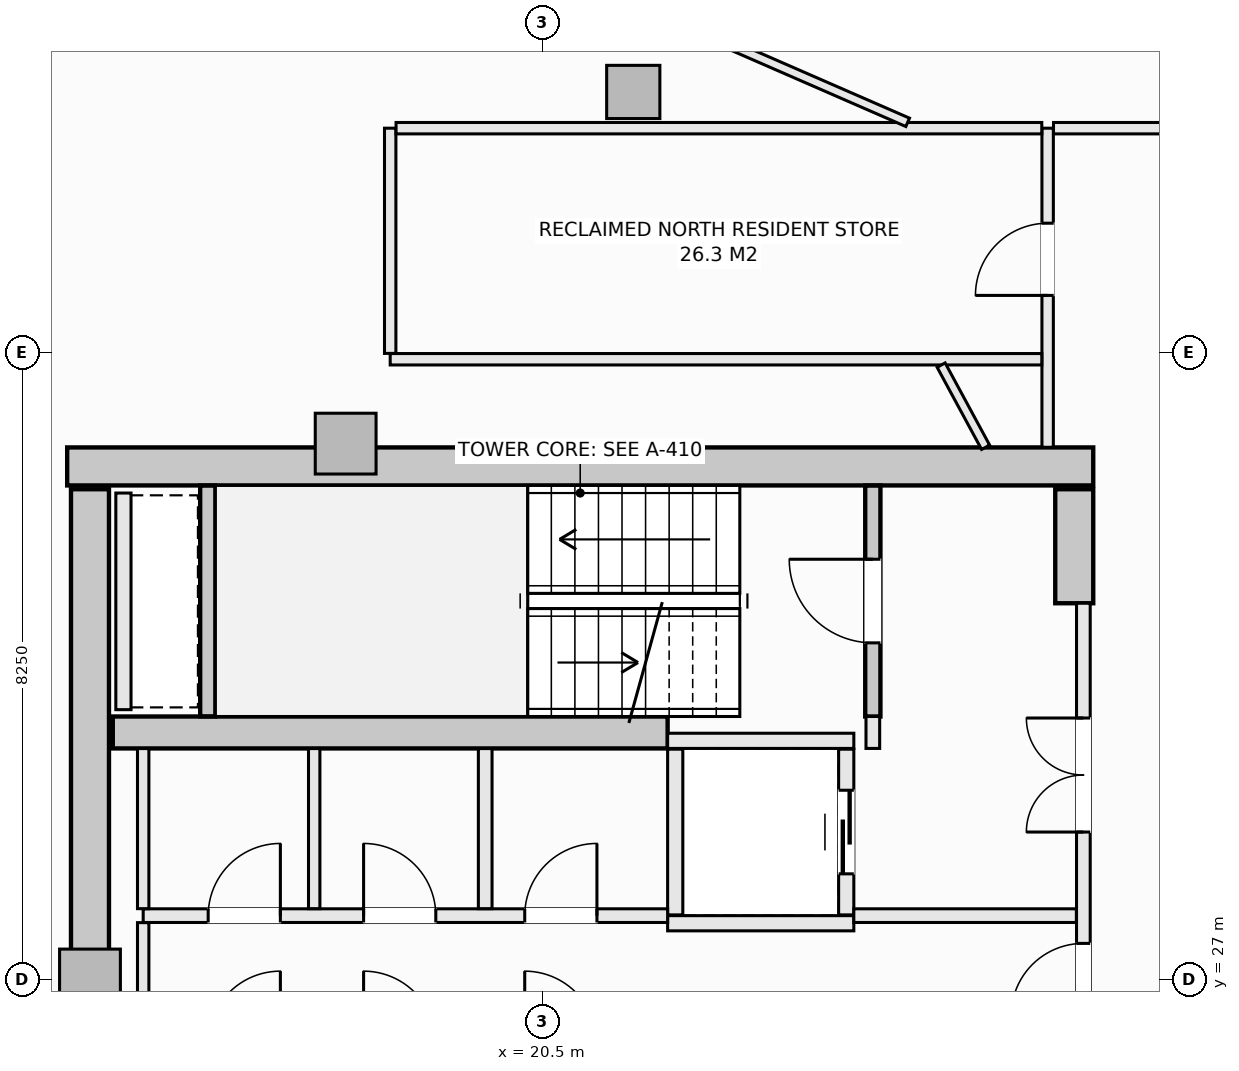
"""IFC4 building model, lengths in metres.
Left out: names, types, materials, properties, quantities, classifications, styles, units other than length and angle.
Written with IfcOpenShell. Run it as: python <this file> out.ifc"""

import sys

from ifc_helpers import new_model, si_unit, direction, frame, frame_2d, origin, origin_2d, place, context, subcontext, project, spatial, rectangle, extrude, element, fill, save


model = new_model("IFC4")
c1 = context("Model", 3, precision=1e-05, world=origin(), true_north=direction((0.0, 1.0)))
c2 = subcontext(c1, "Body", "Model", "MODEL_VIEW")
j1 = project(units=[si_unit("LENGTHUNIT", "METRE"), si_unit("PLANEANGLEUNIT", "RADIAN")], contexts=[c1])
p1 = place(None, origin())
s1 = spatial("IfcSite", under=j1, at=p1, CompositionType="ELEMENT")
p2 = place(p1, origin())
s2 = spatial("IfcBuilding", under=s1, at=p2, CompositionType="ELEMENT")
p3 = place(p2, frame((0.0, 0.0, 226.1)))
s3 = spatial("IfcBuildingStorey", under=s2, at=p3, CompositionType="ELEMENT", Elevation=226.1)
p4 = place(p3, frame((14.25, 33.75, -0.27), z_axis=(0.0, 0.0, 1.0), x_axis=(1.0, 0.0, 0.0)))
e1 = element("IfcWall", 1, at=p4, inside=s3, PredefinedType="SHEAR", context=c2, shape_type="SweptSolid", body=[
    extrude(rectangle(XDim=13.5, YDim=0.5, at=frame_2d((6.75, 0.0))), origin(), (0.0, 0.0, 1.0), 3.3),
])
p5 = place(p3, frame((14.55, 20.55, -0.27), z_axis=(0.0, 0.0, 1.0), x_axis=(0.0, 1.0, 0.0)))
e2 = element("IfcWall", 2, at=p5, inside=s3, PredefinedType="SHEAR", context=c2, shape_type="SweptSolid", body=[
    extrude(rectangle(XDim=12.9, YDim=0.5, at=frame_2d((6.45, 0.0))), origin(), (0.0, 0.0, 1.0), 3.3),
])
p6 = place(p3, frame((27.5, 31.95, -0.27), z_axis=(0.0, 0.0, 1.0), x_axis=(0.0, 1.0, 0.0)))
e3 = element("IfcWall", 3, at=p6, inside=s3, PredefinedType="SHEAR", context=c2, shape_type="SweptSolid", body=[
    extrude(rectangle(XDim=1.5, YDim=0.5, at=frame_2d((0.75, 0.0))), origin(), (0.0, 0.0, 1.0), 3.3),
])
p7 = place(p3, frame((14.85, 30.25, -0.27), z_axis=(0.0, 0.0, 1.0), x_axis=(1.0, 0.0, 0.0)))
e4 = element("IfcWall", 4, at=p7, inside=s3, PredefinedType="SHEAR", context=c2, shape_type="SweptSolid", body=[
    extrude(rectangle(XDim=7.3, YDim=0.42, at=frame_2d((3.65, 0.0))), origin(), (0.0, 0.0, 1.0), 3.3),
])
p8 = place(p3, frame((21.698, 38.677, -0.27), z_axis=(0.0, 0.0, 1.0), x_axis=(1.0, 0.0, 0.0)))
e5 = element("IfcColumn", 5, at=p8, inside=s3, PredefinedType="COLUMN", context=c2, shape_type="SweptSolid", body=[
    extrude(rectangle(XDim=0.7, YDim=0.7, at=origin_2d()), origin(), (0.0, 0.0, 1.0), 3.3),
])
for number, where, z_axis, x_axis in (
    (6, (17.914, 34.05, -0.27), (0.0, 0.0, 1.0), (1.0, 0.0, 0.0)),
    (7, (14.55, 27.0, -0.27), (0.0, 0.0, 1.0), (1.0, 0.0, 0.0)),
):
    element("IfcColumn", number, at=place(p3, frame(where, z_axis=z_axis, x_axis=x_axis)), inside=s3, PredefinedType="PILASTER", context=c2, shape_type="SweptSolid", body=[
        extrude(rectangle(XDim=0.8, YDim=0.8, at=origin_2d()), origin(), (0.0, 0.0, 1.0), 3.3),
    ])
p9 = place(p3, frame((8.691, 36.9, 0.0), z_axis=(0.0, 0.0, 1.0), x_axis=(0.901348331142, 0.433094892545, 0.0)))
e8 = element("IfcWall", 8, at=p9, inside=s3, PredefinedType="SOLIDWALL", context=c2, shape_type="SweptSolid", body=[
    extrude(rectangle(XDim=6.021, YDim=0.3, at=frame_2d((3.01, 0.0))), origin(), (0.0, 0.0, 1.0), 2.605),
])
p10 = place(p9, frame((1.91, 0.0, 0.72)))
e9 = element("IfcOpeningElement", 9, at=p10, cuts=e8, PredefinedType="OPENING", context=c2, shape_type="SweptSolid", body=[
    extrude(rectangle(XDim=2.2, YDim=1.65, at=frame_2d((1.1, 0.825))), frame((0.0, 0.16, 0.0), z_axis=(0.0, -1.0, 0.0), x_axis=(1.0, 0.0, 0.0)), (0.0, 0.0, 1.0), 0.32),
])
p11 = place(p3, frame((24.85, 30.46, -0.27), z_axis=(0.0, 0.0, 1.0), x_axis=(0.0, 1.0, 0.0)))
e10 = element("IfcWall", 10, at=p11, inside=s3, PredefinedType="SHEAR", context=c2, shape_type="SweptSolid", body=[
    extrude(rectangle(XDim=3.038, YDim=0.2, at=frame_2d((1.519, 0.0))), origin(), (0.0, 0.0, 1.0), 3.3),
])
p12 = place(p11, frame((0.969, 0.0, 0.27)))
e11 = element("IfcOpeningElement", 11, at=p12, cuts=e10, PredefinedType="OPENING", context=c2, shape_type="SweptSolid", body=[
    extrude(rectangle(XDim=1.1, YDim=2.15, at=frame_2d((0.55, 1.075))), frame((0.0, 0.11, 0.0), z_axis=(0.0, -1.0, 0.0), x_axis=(1.0, 0.0, 0.0)), (0.0, 0.0, 1.0), 0.22),
])
p13 = place(p3, frame((16.1, 30.462, -0.27), z_axis=(0.0, 0.0, 1.0), x_axis=(0.0, 1.0, 0.0)))
e12 = element("IfcWall", 12, at=p13, inside=s3, PredefinedType="SHEAR", context=c2, shape_type="SweptSolid", body=[
    extrude(rectangle(XDim=3.036, YDim=0.2, at=frame_2d((1.518, 0.0))), origin(), (0.0, 0.0, 1.0), 3.3),
])
for number, where, z_axis, x_axis in (
    (13, (22.15, 30.14, 0.0), (0.0, 0.0, 1.0), (1.0, 0.0, 0.0)),
    (14, (22.15, 27.74, 0.0), (0.0, 0.0, 1.0), (1.0, 0.0, 0.0)),
):
    element("IfcWall", number, at=place(p3, frame(where, z_axis=z_axis, x_axis=x_axis)), inside=s3, PredefinedType="SOLIDWALL", context=c2, shape_type="SweptSolid", body=[
        extrude(rectangle(XDim=2.45, YDim=0.2, at=frame_2d((1.225, 0.0))), origin(), (0.0, 0.0, 1.0), 3.03),
    ])
p14 = place(p3, frame((22.25, 27.85, 0.0), z_axis=(0.0, 0.0, 1.0), x_axis=(0.0, 1.0, 0.0)))
e15 = element("IfcWall", 15, at=p14, inside=s3, PredefinedType="SOLIDWALL", context=c2, shape_type="SweptSolid", body=[
    extrude(rectangle(XDim=2.18, YDim=0.2, at=frame_2d((1.09, 0.0))), origin(), (0.0, 0.0, 1.0), 3.03),
])
p15 = place(p3, frame((24.5, 27.85, 0.0), z_axis=(0.0, 0.0, 1.0), x_axis=(0.0, 1.0, 0.0)))
e16 = element("IfcWall", 16, at=p15, inside=s3, PredefinedType="SOLIDWALL", context=c2, shape_type="SweptSolid", body=[
    extrude(rectangle(XDim=2.18, YDim=0.2, at=frame_2d((1.09, 0.0))), origin(), (0.0, 0.0, 1.0), 3.03),
])
p16 = place(p15, frame((0.54, 0.0, 0.0)))
e17 = element("IfcOpeningElement", 17, at=p16, cuts=e16, PredefinedType="OPENING", context=c2, shape_type="SweptSolid", body=[
    extrude(rectangle(XDim=1.1, YDim=2.2, at=frame_2d((0.55, 1.1))), frame((0.0, 0.11, 0.0), z_axis=(0.0, -1.0, 0.0), x_axis=(1.0, 0.0, 0.0)), (0.0, 0.0, 1.0), 0.22),
])
p17 = place(p3, frame((14.99, 30.55, 0.0), z_axis=(0.0, 0.0, 1.0), x_axis=(0.0, 1.0, 0.0)))
e18 = element("IfcWall", 18, at=p17, inside=s3, PredefinedType="SOLIDWALL", context=c2, shape_type="SweptSolid", body=[
    extrude(rectangle(XDim=2.85, YDim=0.2, at=frame_2d((1.425, 0.0))), origin(), (0.0, 0.0, 1.0), 3.03),
])
p18 = place(p3, frame((24.85, 30.04, 0.0), z_axis=(0.0, 0.0, 1.0), x_axis=(0.0, 1.0, 0.0)))
e19 = element("IfcWall", 19, at=p18, inside=s3, PredefinedType="SOLIDWALL", context=c2, shape_type="SweptSolid", body=[
    extrude(rectangle(XDim=0.42, YDim=0.18, at=frame_2d((0.21, 0.0))), origin(), (0.0, 0.0, 1.0), 3.03),
])
p19 = place(p3, frame((27.62, 22.05, 0.0), z_axis=(0.0, 0.0, 1.0), x_axis=(0.0, 1.0, 0.0)))
e20 = element("IfcWall", 20, at=p19, inside=s3, PredefinedType="SOLIDWALL", context=c2, shape_type="SweptSolid", body=[
    extrude(rectangle(XDim=9.9, YDim=0.18, at=frame_2d((4.95, 0.0))), origin(), (0.0, 0.0, 1.0), 3.03),
])
p20 = place(p19, frame((4.475, 0.0, 0.0)))
e21 = element("IfcOpeningElement", 21, at=p20, cuts=e20, PredefinedType="OPENING", context=c2, shape_type="SweptSolid", body=[
    extrude(rectangle(XDim=0.95, YDim=2.1, at=frame_2d((0.475, 1.05))), frame((0.0, 0.1, 0.0), z_axis=(0.0, -1.0, 0.0), x_axis=(1.0, 0.0, 0.0)), (0.0, 0.0, 1.0), 0.2),
])
p21 = place(p19, frame((6.89, 0.0, 0.0)))
e22 = element("IfcOpeningElement", 22, at=p21, cuts=e20, PredefinedType="OPENING", context=c2, shape_type="SweptSolid", body=[
    extrude(rectangle(XDim=1.5, YDim=2.2, at=frame_2d((0.75, 1.1))), frame((0.0, 0.1, 0.0), z_axis=(0.0, -1.0, 0.0), x_axis=(1.0, 0.0, 0.0)), (0.0, 0.0, 1.0), 0.2),
])
p22 = place(p19, frame((1.51, 0.0, 0.0)))
e23 = element("IfcOpeningElement", 23, at=p22, cuts=e20, PredefinedType="OPENING", context=c2, shape_type="SweptSolid", body=[
    extrude(rectangle(XDim=1.5, YDim=2.2, at=frame_2d((0.75, 1.1))), frame((0.0, 0.1, 0.0), z_axis=(0.0, -1.0, 0.0), x_axis=(1.0, 0.0, 0.0)), (0.0, 0.0, 1.0), 0.2),
])
p23 = place(p3, frame((15.25, 27.84, 0.0), z_axis=(0.0, 0.0, 1.0), x_axis=(1.0, 0.0, 0.0)))
e24 = element("IfcWall", 24, at=p23, inside=s3, PredefinedType="SOLIDWALL", context=c2, shape_type="SweptSolid", body=[
    extrude(rectangle(XDim=6.9, YDim=0.18, at=frame_2d((3.45, 0.0))), origin(), (0.0, 0.0, 1.0), 3.03),
])
p24 = place(p23, frame((5.02, 0.0, 0.0)))
e25 = element("IfcOpeningElement", 25, at=p24, cuts=e24, PredefinedType="OPENING", context=c2, shape_type="SweptSolid", body=[
    extrude(rectangle(XDim=0.95, YDim=2.1, at=frame_2d((0.475, 1.05))), frame((0.0, 0.1, 0.0), z_axis=(0.0, -1.0, 0.0), x_axis=(1.0, 0.0, 0.0)), (0.0, 0.0, 1.0), 0.2),
])
p25 = place(p23, frame((0.855, 0.0, 0.0)))
e26 = element("IfcOpeningElement", 26, at=p25, cuts=e24, PredefinedType="OPENING", context=c2, shape_type="SweptSolid", body=[
    extrude(rectangle(XDim=0.95, YDim=2.1, at=frame_2d((0.475, 1.05))), frame((0.0, 0.1, 0.0), z_axis=(0.0, -1.0, 0.0), x_axis=(1.0, 0.0, 0.0)), (0.0, 0.0, 1.0), 0.2),
])
p26 = place(p23, frame((2.9, 0.0, 0.0)))
e27 = element("IfcOpeningElement", 27, at=p26, cuts=e24, PredefinedType="OPENING", context=c2, shape_type="SweptSolid", body=[
    extrude(rectangle(XDim=0.95, YDim=2.1, at=frame_2d((0.475, 1.05))), frame((0.0, 0.1, 0.0), z_axis=(0.0, -1.0, 0.0), x_axis=(1.0, 0.0, 0.0)), (0.0, 0.0, 1.0), 0.2),
])
p27 = place(p3, frame((24.6, 27.84, 0.0), z_axis=(0.0, 0.0, 1.0), x_axis=(1.0, 0.0, 0.0)))
e28 = element("IfcWall", 28, at=p27, inside=s3, PredefinedType="SOLIDWALL", context=c2, shape_type="SweptSolid", body=[
    extrude(rectangle(XDim=2.928, YDim=0.18, at=frame_2d((1.464, 0.0))), origin(), (0.0, 0.0, 1.0), 3.03),
])
p28 = place(p3, frame((15.25, 26.252, 0.0), z_axis=(0.0, 0.0, 1.0), x_axis=(0.0, 1.0, 0.0)))
e29 = element("IfcWall", 29, at=p28, inside=s3, PredefinedType="PARTITIONING", context=c2, shape_type="SweptSolid", body=[
    extrude(rectangle(XDim=1.496, YDim=0.15, at=frame_2d((0.748, 0.0))), origin(), (0.0, 0.0, 1.0), 3.03),
])
p29 = place(p3, frame((15.25, 27.932, 0.0), z_axis=(0.0, 0.0, 1.0), x_axis=(0.0, 1.0, 0.0)))
e30 = element("IfcWall", 30, at=p29, inside=s3, PredefinedType="PARTITIONING", context=c2, shape_type="SweptSolid", body=[
    extrude(rectangle(XDim=2.106, YDim=0.15, at=frame_2d((1.053, 0.0))), origin(), (0.0, 0.0, 1.0), 3.03),
])
p30 = place(p3, frame((19.75, 27.932, 0.0), z_axis=(0.0, 0.0, 1.0), x_axis=(0.0, 1.0, 0.0)))
e31 = element("IfcWall", 31, at=p30, inside=s3, PredefinedType="SOLIDWALL", context=c2, shape_type="SweptSolid", body=[
    extrude(rectangle(XDim=2.106, YDim=0.18, at=frame_2d((1.053, 0.0))), origin(), (0.0, 0.0, 1.0), 3.03),
])
p31 = place(p3, frame((17.5, 27.932, 0.0), z_axis=(0.0, 0.0, 1.0), x_axis=(0.0, 1.0, 0.0)))
e32 = element("IfcWall", 32, at=p31, inside=s3, PredefinedType="PARTITIONING", context=c2, shape_type="SweptSolid", body=[
    extrude(rectangle(XDim=2.106, YDim=0.15, at=frame_2d((1.053, 0.0))), origin(), (0.0, 0.0, 1.0), 3.03),
])
p32 = place(p3, frame((27.15, 34.002, 0.0), z_axis=(0.0, 0.0, 1.0), x_axis=(0.0, 1.0, 0.0)))
e33 = element("IfcWall", 33, at=p32, inside=s3, PredefinedType="PARTITIONING", context=c2, shape_type="SweptSolid", body=[
    extrude(rectangle(XDim=4.198, YDim=0.15, at=frame_2d((2.099, 0.0))), origin(), (0.0, 0.0, 1.0), 3.03),
])
p33 = place(p32, frame((1.998, 0.0, 0.0)))
e34 = element("IfcOpeningElement", 34, at=p33, cuts=e33, PredefinedType="OPENING", context=c2, shape_type="SweptSolid", body=[
    extrude(rectangle(XDim=0.95, YDim=2.1, at=frame_2d((0.475, 1.05))), frame((0.0, 0.085, 0.0), z_axis=(0.0, -1.0, 0.0), x_axis=(1.0, 0.0, 0.0)), (0.0, 0.0, 1.0), 0.17),
])
p34 = place(p3, frame((18.5, 35.16, 0.0), z_axis=(0.0, 0.0, 1.0), x_axis=(1.0, 0.0, 0.0)))
e35 = element("IfcWall", 35, at=p34, inside=s3, PredefinedType="PARTITIONING", context=c2, shape_type="SweptSolid", body=[
    extrude(rectangle(XDim=8.573, YDim=0.15, at=frame_2d((4.287, 0.0))), origin(), (0.0, 0.0, 1.0), 3.03),
])
p35 = place(p3, frame((18.5, 35.237, 0.0), z_axis=(0.0, 0.0, 1.0), x_axis=(0.0, 1.0, 0.0)))
e36 = element("IfcWall", 36, at=p35, inside=s3, PredefinedType="PARTITIONING", context=c2, shape_type="SweptSolid", body=[
    extrude(rectangle(XDim=2.963, YDim=0.15, at=frame_2d((1.481, 0.0))), origin(), (0.0, 0.0, 1.0), 3.03),
])
p36 = place(p3, frame((18.577, 38.2, 0.0), z_axis=(0.0, 0.0, 1.0), x_axis=(1.0, 0.0, 0.0)))
e37 = element("IfcWall", 37, at=p36, inside=s3, PredefinedType="PARTITIONING", context=c2, shape_type="SweptSolid", body=[
    extrude(rectangle(XDim=8.496, YDim=0.15, at=frame_2d((4.248, 0.0))), origin(), (0.0, 0.0, 1.0), 3.03),
])
p37 = place(p3, frame((27.227, 38.2, 0.0), z_axis=(0.0, 0.0, 1.0), x_axis=(1.0, 0.0, 0.0)))
e38 = element("IfcWall", 38, at=p37, inside=s3, PredefinedType="PARTITIONING", context=c2, shape_type="SweptSolid", body=[
    extrude(rectangle(XDim=2.711, YDim=0.15, at=frame_2d((1.355, 0.0))), origin(), (0.0, 0.0, 1.0), 3.03),
])
p38 = place(p3, frame((16.392, 42.166, 0.0), z_axis=(0.0, 0.0, 1.0), x_axis=(0.916624998673, -0.399748185496, 0.0)))
e39 = element("IfcWall", 39, at=p38, inside=s3, PredefinedType="PARTITIONING", context=c2, shape_type="SweptSolid", body=[
    extrude(rectangle(XDim=9.728, YDim=0.12, at=frame_2d((4.864, 0.0))), origin(), (0.0, 0.0, 1.0), 2.478),
])
p39 = place(p3, frame((25.749, 35.083, 0.0), z_axis=(0.0, 0.0, 1.0), x_axis=(0.476052805352, -0.879416696746, 0.0)))
e40 = element("IfcWall", 40, at=p39, inside=s3, PredefinedType="PARTITIONING", context=c2, shape_type="SweptSolid", body=[
    extrude(rectangle(XDim=1.229, YDim=0.12, at=frame_2d((0.615, 0.0))), origin(), (0.0, 0.0, 1.0), 3.03),
])
p40 = place(p12, origin())
e41 = element("IfcDoor", 41, at=p40, inside=s3, OperationType="SINGLE_SWING_RIGHT", PredefinedType="DOOR", context=c2, shape_type="SweptSolid", body=[
    extrude(rectangle(XDim=1.1, YDim=2.15, at=frame_2d((0.55, 1.075))), frame((0.0, 0.025, 0.0), z_axis=(0.0, -1.0, 0.0), x_axis=(1.0, 0.0, 0.0)), (0.0, 0.0, 1.0), 0.05),
])
fill(e11, e41)
p41 = place(p16, origin())
e42 = element("IfcDoor", 42, at=p41, inside=s3, OperationType="SLIDING_TO_LEFT", PredefinedType="DOOR", context=c2, shape_type="SweptSolid", body=[
    extrude(rectangle(XDim=1.1, YDim=2.2, at=frame_2d((0.55, 1.1))), frame((0.0, 0.025, 0.0), z_axis=(0.0, -1.0, 0.0), x_axis=(1.0, 0.0, 0.0)), (0.0, 0.0, 1.0), 0.05),
])
fill(e17, e42)
p42 = place(p20, origin())
e43 = element("IfcDoor", 43, at=p42, inside=s3, OperationType="SINGLE_SWING_LEFT", PredefinedType="DOOR", context=c2, shape_type="SweptSolid", body=[
    extrude(rectangle(XDim=0.95, YDim=2.1, at=frame_2d((0.475, 1.05))), frame((0.0, 0.025, 0.0), z_axis=(0.0, -1.0, 0.0), x_axis=(1.0, 0.0, 0.0)), (0.0, 0.0, 1.0), 0.05),
])
fill(e21, e43)
p43 = place(p21, origin())
e44 = element("IfcDoor", 44, at=p43, inside=s3, OperationType="DOUBLE_DOOR_SINGLE_SWING", PredefinedType="DOOR", context=c2, shape_type="SweptSolid", body=[
    extrude(rectangle(XDim=1.5, YDim=2.2, at=frame_2d((0.75, 1.1))), frame((0.0, 0.025, 0.0), z_axis=(0.0, -1.0, 0.0), x_axis=(1.0, 0.0, 0.0)), (0.0, 0.0, 1.0), 0.05),
])
fill(e22, e44)
p44 = place(p24, origin())
e45 = element("IfcDoor", 45, at=p44, inside=s3, OperationType="SINGLE_SWING_RIGHT", PredefinedType="DOOR", context=c2, shape_type="SweptSolid", body=[
    extrude(rectangle(XDim=0.95, YDim=2.1, at=frame_2d((0.475, 1.05))), frame((0.0, 0.025, 0.0), z_axis=(0.0, -1.0, 0.0), x_axis=(1.0, 0.0, 0.0)), (0.0, 0.0, 1.0), 0.05),
])
fill(e25, e45)
p45 = place(p25, origin())
e46 = element("IfcDoor", 46, at=p45, inside=s3, OperationType="SINGLE_SWING_RIGHT", PredefinedType="DOOR", context=c2, shape_type="SweptSolid", body=[
    extrude(rectangle(XDim=0.95, YDim=2.1, at=frame_2d((0.475, 1.05))), frame((0.0, 0.025, 0.0), z_axis=(0.0, -1.0, 0.0), x_axis=(1.0, 0.0, 0.0)), (0.0, 0.0, 1.0), 0.05),
])
fill(e26, e46)
p46 = place(p26, origin())
e47 = element("IfcDoor", 47, at=p46, inside=s3, OperationType="SINGLE_SWING_LEFT", PredefinedType="DOOR", context=c2, shape_type="SweptSolid", body=[
    extrude(rectangle(XDim=0.95, YDim=2.1, at=frame_2d((0.475, 1.05))), frame((0.0, 0.025, 0.0), z_axis=(0.0, -1.0, 0.0), x_axis=(1.0, 0.0, 0.0)), (0.0, 0.0, 1.0), 0.05),
])
fill(e27, e47)
p47 = place(p33, origin())
e48 = element("IfcDoor", 48, at=p47, inside=s3, OperationType="SINGLE_SWING_LEFT", PredefinedType="DOOR", context=c2, shape_type="SweptSolid", body=[
    extrude(rectangle(XDim=0.95, YDim=2.1, at=frame_2d((0.475, 1.05))), frame((0.0, 0.025, 0.0), z_axis=(0.0, -1.0, 0.0), x_axis=(1.0, 0.0, 0.0)), (0.0, 0.0, 1.0), 0.05),
])
fill(e34, e48)
save(model, sys.argv[1])
